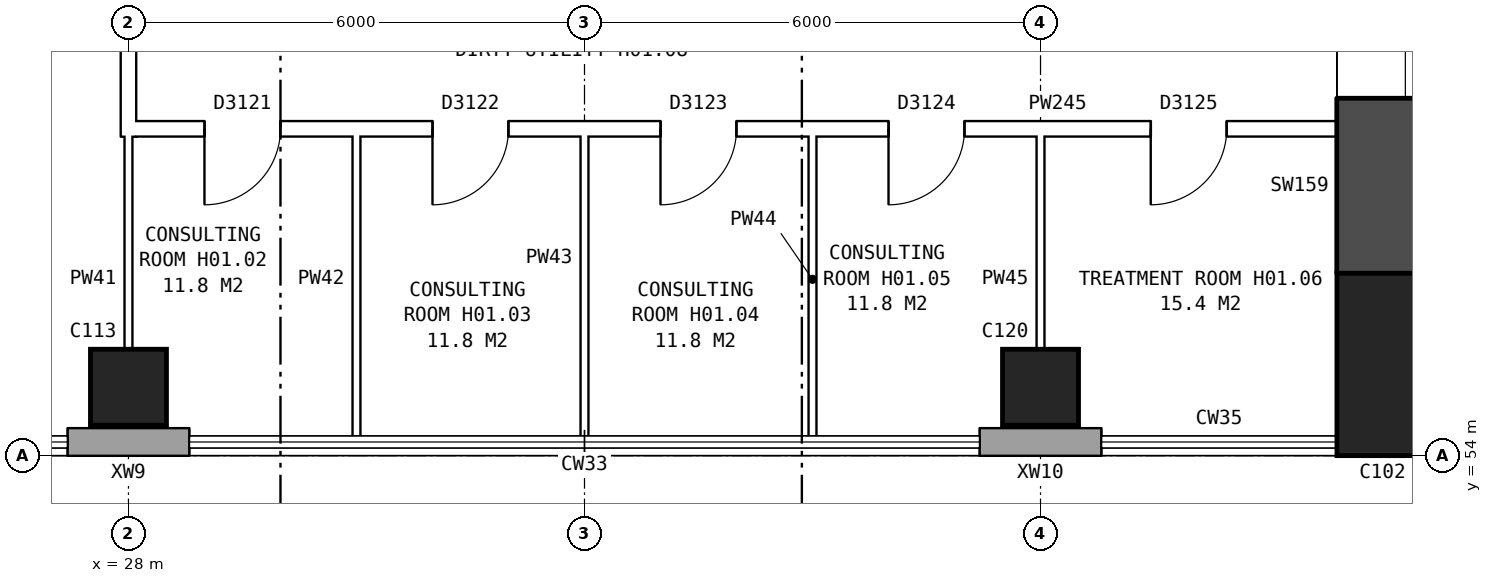
"""IFC4 building model, lengths in metres.
Left out: names, types, materials, properties, quantities, classifications, styles, units other than length and angle.
Written with IfcOpenShell. Run it as: python <this file> out.ifc"""

import sys

from ifc_helpers import new_model, si_unit, direction, frame, frame_2d, origin, origin_2d, place, context, subcontext, project, spatial, rectangle, extrude, element, fill, save


model = new_model("IFC4")
c1 = context("Model", 3, precision=1e-05, world=origin(), true_north=direction((0.0, 1.0)))
c2 = subcontext(c1, "Body", "Model", "MODEL_VIEW")
j1 = project(units=[si_unit("LENGTHUNIT", "METRE"), si_unit("PLANEANGLEUNIT", "RADIAN")], contexts=[c1])
p1 = place(None, origin())
s1 = spatial("IfcSite", under=j1, at=p1, CompositionType="ELEMENT")
p2 = place(p1, origin())
s2 = spatial("IfcBuilding", under=s1, at=p2, CompositionType="ELEMENT")
p3 = place(p2, frame((0.0, 0.0, 5.5)))
s3 = spatial("IfcBuildingStorey", under=s2, at=p3, CompositionType="ELEMENT", Elevation=5.5)
p4 = place(p3, frame((44.5, 55.2, -0.3), z_axis=(0.0, 0.0, 1.0), x_axis=(1.0, 0.0, 0.0)))
e1 = element("IfcColumn", 1, at=p4, inside=s3, PredefinedType="COLUMN", context=c2, shape_type="SweptSolid", body=[
    extrude(rectangle(XDim=1.2, YDim=2.4, at=origin_2d()), origin(), (0.0, 0.0, 1.0), 4.6),
])
p5 = place(p3, frame((44.5, 56.4, -0.3), z_axis=(0.0, 0.0, 1.0), x_axis=(0.0, 1.0, 0.0)))
e2 = element("IfcWall", 2, at=p5, inside=s3, PredefinedType="SHEAR", context=c2, shape_type="SweptSolid", body=[
    extrude(rectangle(XDim=27.2, YDim=1.2, at=frame_2d((13.6, 0.0))), origin(), (0.0, 0.0, 1.0), 4.6),
])
p6 = place(p5, frame((2.3, 0.0, 0.8)))
e3 = element("IfcOpeningElement", 3, at=p6, cuts=e2, PredefinedType="OPENING", context=c2, shape_type="SweptSolid", body=[
    extrude(rectangle(XDim=1.6, YDim=1.8, at=frame_2d((0.8, 0.9))), frame((0.0, 0.61, 0.0), z_axis=(0.0, -1.0, 0.0), x_axis=(1.0, 0.0, 0.0)), (0.0, 0.0, 1.0), 1.22),
])
p7 = place(p5, frame((5.3, 0.0, 0.8)))
e4 = element("IfcOpeningElement", 4, at=p7, cuts=e2, PredefinedType="OPENING", context=c2, shape_type="SweptSolid", body=[
    extrude(rectangle(XDim=1.6, YDim=1.8, at=frame_2d((0.8, 0.9))), frame((0.0, 0.61, 0.0), z_axis=(0.0, -1.0, 0.0), x_axis=(1.0, 0.0, 0.0)), (0.0, 0.0, 1.0), 1.22),
])
p8 = place(p5, frame((8.3, 0.0, 0.8)))
e5 = element("IfcOpeningElement", 5, at=p8, cuts=e2, PredefinedType="OPENING", context=c2, shape_type="SweptSolid", body=[
    extrude(rectangle(XDim=1.6, YDim=1.8, at=frame_2d((0.8, 0.9))), frame((0.0, 0.61, 0.0), z_axis=(0.0, -1.0, 0.0), x_axis=(1.0, 0.0, 0.0)), (0.0, 0.0, 1.0), 1.22),
])
p9 = place(p5, frame((11.3, 0.0, 0.8)))
e6 = element("IfcOpeningElement", 6, at=p9, cuts=e2, PredefinedType="OPENING", context=c2, shape_type="SweptSolid", body=[
    extrude(rectangle(XDim=1.6, YDim=1.8, at=frame_2d((0.8, 0.9))), frame((0.0, 0.61, 0.0), z_axis=(0.0, -1.0, 0.0), x_axis=(1.0, 0.0, 0.0)), (0.0, 0.0, 1.0), 1.22),
])
p10 = place(p5, frame((14.3, 0.0, 0.8)))
e7 = element("IfcOpeningElement", 7, at=p10, cuts=e2, PredefinedType="OPENING", context=c2, shape_type="SweptSolid", body=[
    extrude(rectangle(XDim=1.6, YDim=1.8, at=frame_2d((0.8, 0.9))), frame((0.0, 0.61, 0.0), z_axis=(0.0, -1.0, 0.0), x_axis=(1.0, 0.0, 0.0)), (0.0, 0.0, 1.0), 1.22),
])
p11 = place(p5, frame((17.3, 0.0, 0.8)))
e8 = element("IfcOpeningElement", 8, at=p11, cuts=e2, PredefinedType="OPENING", context=c2, shape_type="SweptSolid", body=[
    extrude(rectangle(XDim=1.6, YDim=1.8, at=frame_2d((0.8, 0.9))), frame((0.0, 0.61, 0.0), z_axis=(0.0, -1.0, 0.0), x_axis=(1.0, 0.0, 0.0)), (0.0, 0.0, 1.0), 1.22),
])
p12 = place(p5, frame((20.3, 0.0, 0.8)))
e9 = element("IfcOpeningElement", 9, at=p12, cuts=e2, PredefinedType="OPENING", context=c2, shape_type="SweptSolid", body=[
    extrude(rectangle(XDim=1.6, YDim=1.8, at=frame_2d((0.8, 0.9))), frame((0.0, 0.61, 0.0), z_axis=(0.0, -1.0, 0.0), x_axis=(1.0, 0.0, 0.0)), (0.0, 0.0, 1.0), 1.22),
])
p13 = place(p5, frame((23.3, 0.0, 0.8)))
e10 = element("IfcOpeningElement", 10, at=p13, cuts=e2, PredefinedType="OPENING", context=c2, shape_type="SweptSolid", body=[
    extrude(rectangle(XDim=1.6, YDim=1.8, at=frame_2d((0.8, 0.9))), frame((0.0, 0.61, 0.0), z_axis=(0.0, -1.0, 0.0), x_axis=(1.0, 0.0, 0.0)), (0.0, 0.0, 1.0), 1.22),
])
for number, where, z_axis, x_axis in (
    (11, (28.0, 54.9, 0.0), (0.0, 0.0, 1.0), (1.0, 0.0, 0.0)),
    (12, (40.0, 54.9, 0.0), (0.0, 0.0, 1.0), (1.0, 0.0, 0.0)),
):
    element("IfcColumn", number, at=place(p3, frame(where, z_axis=z_axis, x_axis=x_axis)), inside=s3, PredefinedType="COLUMN", context=c2, shape_type="SweptSolid", body=[
        extrude(rectangle(XDim=1.0, YDim=1.0, at=origin_2d()), origin(), (0.0, 0.0, 1.0), 4.3),
    ])
for number, where, z_axis, x_axis in (
    (13, (27.2, 54.18, 0.0), (0.0, 0.0, 1.0), (1.0, 0.0, 0.0)),
    (14, (39.2, 54.18, 0.0), (0.0, 0.0, 1.0), (1.0, 0.0, 0.0)),
):
    element("IfcWall", number, at=place(p3, frame(where, z_axis=z_axis, x_axis=x_axis)), inside=s3, PredefinedType="STANDARD", context=c2, shape_type="SweptSolid", body=[
        extrude(rectangle(XDim=1.6, YDim=0.36, at=frame_2d((0.8, 0.0))), origin(), (0.0, 0.0, 1.0), 4.3),
    ])
p14 = place(p3, frame((27.9, 58.3, 0.0), z_axis=(0.0, 0.0, 1.0), x_axis=(1.0, 0.0, 0.0)))
e15 = element("IfcWall", 15, at=p14, inside=s3, PredefinedType="PARTITIONING", context=c2, shape_type="SweptSolid", body=[
    extrude(rectangle(XDim=16.12, YDim=0.2, at=frame_2d((8.06, 0.0))), origin(), (0.0, 0.0, 1.0), 4.3),
])
p15 = place(p14, frame((1.1, 0.0, 0.0)))
e16 = element("IfcOpeningElement", 16, at=p15, cuts=e15, PredefinedType="OPENING", context=c2, shape_type="SweptSolid", body=[
    extrude(rectangle(XDim=1.0, YDim=2.1, at=frame_2d((0.5, 1.05))), frame((0.0, 0.11, 0.0), z_axis=(0.0, -1.0, 0.0), x_axis=(1.0, 0.0, 0.0)), (0.0, 0.0, 1.0), 0.22),
])
p16 = place(p14, frame((4.1, 0.0, 0.0)))
e17 = element("IfcOpeningElement", 17, at=p16, cuts=e15, PredefinedType="OPENING", context=c2, shape_type="SweptSolid", body=[
    extrude(rectangle(XDim=1.0, YDim=2.1, at=frame_2d((0.5, 1.05))), frame((0.0, 0.11, 0.0), z_axis=(0.0, -1.0, 0.0), x_axis=(1.0, 0.0, 0.0)), (0.0, 0.0, 1.0), 0.22),
])
p17 = place(p14, frame((7.1, 0.0, 0.0)))
e18 = element("IfcOpeningElement", 18, at=p17, cuts=e15, PredefinedType="OPENING", context=c2, shape_type="SweptSolid", body=[
    extrude(rectangle(XDim=1.0, YDim=2.1, at=frame_2d((0.5, 1.05))), frame((0.0, 0.11, 0.0), z_axis=(0.0, -1.0, 0.0), x_axis=(1.0, 0.0, 0.0)), (0.0, 0.0, 1.0), 0.22),
])
p18 = place(p14, frame((10.1, 0.0, 0.0)))
e19 = element("IfcOpeningElement", 19, at=p18, cuts=e15, PredefinedType="OPENING", context=c2, shape_type="SweptSolid", body=[
    extrude(rectangle(XDim=1.0, YDim=2.1, at=frame_2d((0.5, 1.05))), frame((0.0, 0.11, 0.0), z_axis=(0.0, -1.0, 0.0), x_axis=(1.0, 0.0, 0.0)), (0.0, 0.0, 1.0), 0.22),
])
p19 = place(p14, frame((13.55, 0.0, 0.0)))
e20 = element("IfcOpeningElement", 20, at=p19, cuts=e15, PredefinedType="OPENING", context=c2, shape_type="SweptSolid", body=[
    extrude(rectangle(XDim=1.0, YDim=2.1, at=frame_2d((0.5, 1.05))), frame((0.0, 0.11, 0.0), z_axis=(0.0, -1.0, 0.0), x_axis=(1.0, 0.0, 0.0)), (0.0, 0.0, 1.0), 0.22),
])
p20 = place(p3, frame((28.0, 58.198, 0.0), z_axis=(0.0, 0.0, 1.0), x_axis=(0.0, 1.0, 0.0)))
e21 = element("IfcWall", 21, at=p20, inside=s3, PredefinedType="PARTITIONING", context=c2, shape_type="SweptSolid", body=[
    extrude(rectangle(XDim=23.604, YDim=0.2, at=frame_2d((11.802, 0.0))), origin(), (0.0, 0.0, 1.0), 4.3),
])
p21 = place(p20, frame((3.602, 0.0, 0.0)))
e22 = element("IfcOpeningElement", 22, at=p21, cuts=e21, PredefinedType="OPENING", context=c2, shape_type="SweptSolid", body=[
    extrude(rectangle(XDim=1.2, YDim=2.1, at=frame_2d((0.6, 1.05))), frame((0.0, 0.11, 0.0), z_axis=(0.0, -1.0, 0.0), x_axis=(1.0, 0.0, 0.0)), (0.0, 0.0, 1.0), 0.22),
])
p22 = place(p20, frame((8.202, 0.0, 0.0)))
e23 = element("IfcOpeningElement", 23, at=p22, cuts=e21, PredefinedType="OPENING", context=c2, shape_type="SweptSolid", body=[
    extrude(rectangle(XDim=1.2, YDim=2.1, at=frame_2d((0.6, 1.05))), frame((0.0, 0.11, 0.0), z_axis=(0.0, -1.0, 0.0), x_axis=(1.0, 0.0, 0.0)), (0.0, 0.0, 1.0), 0.22),
])
p23 = place(p20, frame((14.302, 0.0, 0.0)))
e24 = element("IfcOpeningElement", 24, at=p23, cuts=e21, PredefinedType="OPENING", context=c2, shape_type="SweptSolid", body=[
    extrude(rectangle(XDim=1.0, YDim=2.1, at=frame_2d((0.5, 1.05))), frame((0.0, 0.11, 0.0), z_axis=(0.0, -1.0, 0.0), x_axis=(1.0, 0.0, 0.0)), (0.0, 0.0, 1.0), 0.22),
])
p24 = place(p20, frame((18.902, 0.0, 0.0)))
e25 = element("IfcOpeningElement", 25, at=p24, cuts=e21, PredefinedType="OPENING", context=c2, shape_type="SweptSolid", body=[
    extrude(rectangle(XDim=1.0, YDim=2.1, at=frame_2d((0.5, 1.05))), frame((0.0, 0.11, 0.0), z_axis=(0.0, -1.0, 0.0), x_axis=(1.0, 0.0, 0.0)), (0.0, 0.0, 1.0), 0.22),
])
p25 = place(p3, frame((28.0, 54.24, 0.0), z_axis=(0.0, 0.0, 1.0), x_axis=(0.0, 1.0, 0.0)))
e26 = element("IfcWall", 26, at=p25, inside=s3, PredefinedType="PARTITIONING", context=c2, shape_type="SweptSolid", body=[
    extrude(rectangle(XDim=4.162, YDim=0.1, at=frame_2d((2.081, 0.0))), origin(), (0.0, 0.0, 1.0), 4.3),
])
for number, where, z_axis, x_axis in (
    (27, (31.0, 54.24, 0.0), (0.0, 0.0, 1.0), (0.0, 1.0, 0.0)),
    (28, (34.0, 54.24, 0.0), (0.0, 0.0, 1.0), (0.0, 1.0, 0.0)),
    (29, (37.0, 54.24, 0.0), (0.0, 0.0, 1.0), (0.0, 1.0, 0.0)),
    (30, (40.0, 54.24, 0.0), (0.0, 0.0, 1.0), (0.0, 1.0, 0.0)),
):
    element("IfcWall", number, at=place(p3, frame(where, z_axis=z_axis, x_axis=x_axis)), inside=s3, PredefinedType="PARTITIONING", context=c2, shape_type="SweptSolid", body=[
        extrude(rectangle(XDim=4.16, YDim=0.1, at=frame_2d((2.08, 0.0))), origin(), (0.0, 0.0, 1.0), 4.3),
    ])
p26 = place(p6, origin())
e31 = element("IfcWindow", 31, at=p26, inside=s3, PartitioningType="SINGLE_PANEL", PredefinedType="WINDOW", context=c2, shape_type="SweptSolid", body=[
    extrude(rectangle(XDim=1.6, YDim=1.8, at=frame_2d((0.8, 0.9))), frame((0.0, -0.27, 0.0), z_axis=(0.0, -1.0, 0.0), x_axis=(1.0, 0.0, 0.0)), (0.0, 0.0, 1.0), 0.06),
])
fill(e3, e31)
p27 = place(p15, frame((1.0, 0.0, 0.0), z_axis=(0.0, 0.0, 1.0), x_axis=(-1.0, 0.0, 0.0)))
e32 = element("IfcDoor", 32, at=p27, inside=s3, OperationType="SINGLE_SWING_RIGHT", PredefinedType="DOOR", context=c2, shape_type="SweptSolid", body=[
    extrude(rectangle(XDim=1.0, YDim=2.1, at=frame_2d((0.5, 1.05))), frame((0.0, 0.025, 0.0), z_axis=(0.0, -1.0, 0.0), x_axis=(1.0, 0.0, 0.0)), (0.0, 0.0, 1.0), 0.05),
])
fill(e16, e32)
p28 = place(p16, frame((1.0, 0.0, 0.0), z_axis=(0.0, 0.0, 1.0), x_axis=(-1.0, 0.0, 0.0)))
e33 = element("IfcDoor", 33, at=p28, inside=s3, OperationType="SINGLE_SWING_RIGHT", PredefinedType="DOOR", context=c2, shape_type="SweptSolid", body=[
    extrude(rectangle(XDim=1.0, YDim=2.1, at=frame_2d((0.5, 1.05))), frame((0.0, 0.025, 0.0), z_axis=(0.0, -1.0, 0.0), x_axis=(1.0, 0.0, 0.0)), (0.0, 0.0, 1.0), 0.05),
])
fill(e17, e33)
p29 = place(p17, frame((1.0, 0.0, 0.0), z_axis=(0.0, 0.0, 1.0), x_axis=(-1.0, 0.0, 0.0)))
e34 = element("IfcDoor", 34, at=p29, inside=s3, OperationType="SINGLE_SWING_RIGHT", PredefinedType="DOOR", context=c2, shape_type="SweptSolid", body=[
    extrude(rectangle(XDim=1.0, YDim=2.1, at=frame_2d((0.5, 1.05))), frame((0.0, 0.025, 0.0), z_axis=(0.0, -1.0, 0.0), x_axis=(1.0, 0.0, 0.0)), (0.0, 0.0, 1.0), 0.05),
])
fill(e18, e34)
p30 = place(p18, frame((1.0, 0.0, 0.0), z_axis=(0.0, 0.0, 1.0), x_axis=(-1.0, 0.0, 0.0)))
e35 = element("IfcDoor", 35, at=p30, inside=s3, OperationType="SINGLE_SWING_RIGHT", PredefinedType="DOOR", context=c2, shape_type="SweptSolid", body=[
    extrude(rectangle(XDim=1.0, YDim=2.1, at=frame_2d((0.5, 1.05))), frame((0.0, 0.025, 0.0), z_axis=(0.0, -1.0, 0.0), x_axis=(1.0, 0.0, 0.0)), (0.0, 0.0, 1.0), 0.05),
])
fill(e19, e35)
p31 = place(p19, frame((1.0, 0.0, 0.0), z_axis=(0.0, 0.0, 1.0), x_axis=(-1.0, 0.0, 0.0)))
e36 = element("IfcDoor", 36, at=p31, inside=s3, OperationType="SINGLE_SWING_RIGHT", PredefinedType="DOOR", context=c2, shape_type="SweptSolid", body=[
    extrude(rectangle(XDim=1.0, YDim=2.1, at=frame_2d((0.5, 1.05))), frame((0.0, 0.025, 0.0), z_axis=(0.0, -1.0, 0.0), x_axis=(1.0, 0.0, 0.0)), (0.0, 0.0, 1.0), 0.05),
])
fill(e20, e36)
save(model, sys.argv[1])
